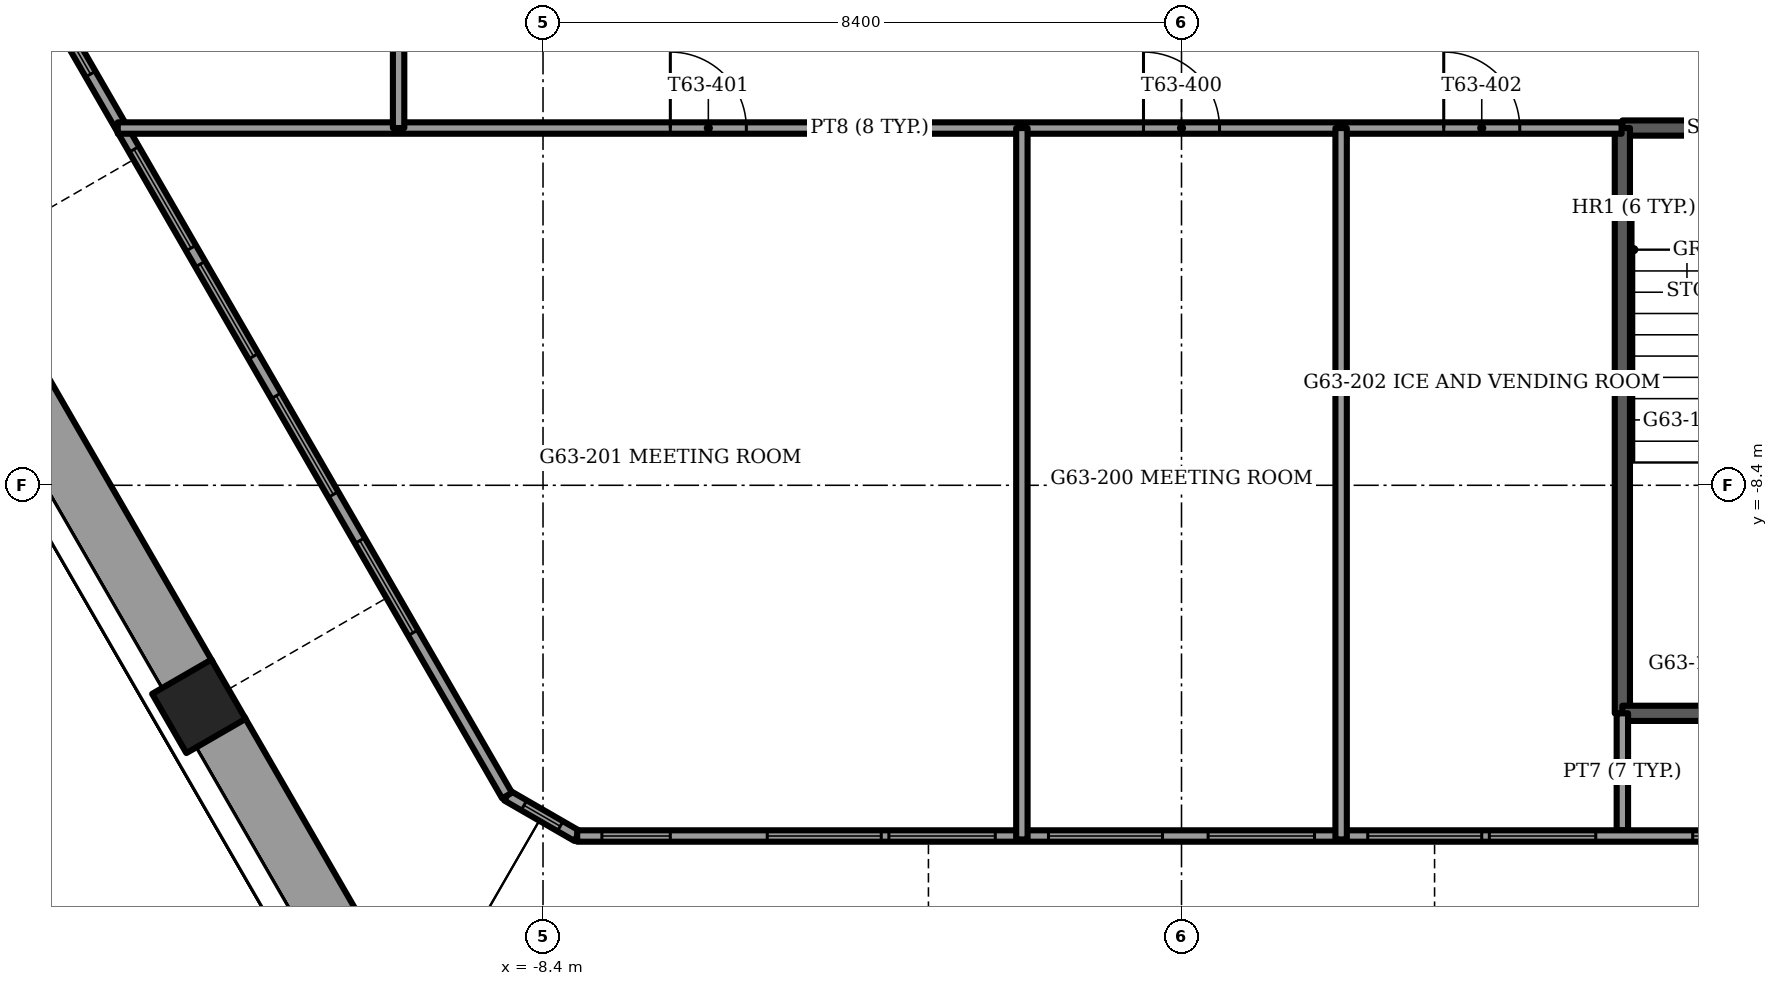
"""IFC4 building model, lengths in metres.
Left out: names, types, materials, properties, quantities, classifications, styles, units other than length and angle.
Written with IfcOpenShell. Run it as: python <this file> out.ifc"""

import sys

from ifc_helpers import new_model, si_unit, direction, frame, frame_2d, origin, origin_2d, place, context, subcontext, project, spatial, rectangle, extrude, element, fill, save


model = new_model("IFC4")
c1 = context("Model", 3, precision=1e-05, world=origin(), true_north=direction((0.0, 1.0)))
c2 = subcontext(c1, "Body", "Model", "MODEL_VIEW")
j1 = project(units=[si_unit("LENGTHUNIT", "METRE"), si_unit("PLANEANGLEUNIT", "RADIAN")], contexts=[c1])
p1 = place(None, origin())
s1 = spatial("IfcSite", under=j1, at=p1, CompositionType="ELEMENT")
p2 = place(p1, origin())
s2 = spatial("IfcBuilding", under=s1, at=p2, CompositionType="ELEMENT")
p3 = place(p2, frame((0.0, 0.0, 256.25)))
s3 = spatial("IfcBuildingStorey", under=s2, at=p3, CompositionType="ELEMENT", Elevation=256.25)
p4 = place(p3, frame((-12.928, -11.308, -1.2), z_axis=(0.0, 0.0, 1.0), x_axis=(-0.5, 0.866025403784, 0.0)))
e1 = element("IfcColumn", 1, at=p4, inside=s3, PredefinedType="COLUMN", context=c2, shape_type="SweptSolid", body=[
    extrude(rectangle(XDim=0.9, YDim=0.9, at=origin_2d()), origin(), (0.0, 0.0, 1.0), 3.75),
])
p5 = place(p3, frame((-16.047, -5.906, 0.0), z_axis=(0.0, 0.0, 1.0), x_axis=(0.500015433515, -0.866016493057, 0.0)))
e2 = element("IfcWall", 2, at=p5, inside=s3, PredefinedType="PARAPET", context=c2, shape_type="SweptSolid", body=[
    extrude(rectangle(XDim=5.819, YDim=0.9, at=frame_2d((2.909, 0.0))), origin(), (0.0, 0.0, 1.0), 1.1),
])
p6 = place(p3, frame((-12.718, -11.672, 0.0), z_axis=(0.0, 0.0, 1.0), x_axis=(0.500012810012, -0.866018007794, 0.0)))
e3 = element("IfcWall", 3, at=p6, inside=s3, PredefinedType="PARAPET", context=c2, shape_type="SweptSolid", body=[
    extrude(rectangle(XDim=4.44, YDim=0.9, at=frame_2d((2.22, 0.0))), origin(), (0.0, 0.0, 1.0), 1.1),
])
p7 = place(p3, frame((-15.246, -1.444, 0.0), z_axis=(0.0, 0.0, 1.0), x_axis=(0.500005990458, -0.866021945164, 0.0)))
e4 = element("IfcWall", 4, at=p7, inside=s3, PredefinedType="SOLIDWALL", context=c2, shape_type="SweptSolid", body=[
    extrude(rectangle(XDim=12.745, YDim=0.15, at=frame_2d((6.373, 0.0))), origin(), (0.0, 0.0, 1.0), 3.45),
])
p8 = place(p7, frame((2.93, 0.0, 0.15)))
e5 = element("IfcOpeningElement", 5, at=p8, cuts=e4, PredefinedType="OPENING", context=c2, shape_type="SweptSolid", body=[
    extrude(rectangle(XDim=1.5, YDim=2.85, at=frame_2d((0.75, 1.425))), frame((0.0, 0.075, 0.0), z_axis=(0.0, -1.0, 0.0), x_axis=(1.0, 0.0, 0.0)), (0.0, 0.0, 1.0), 0.15),
])
p9 = place(p7, frame((4.673, 0.0, 0.15)))
e6 = element("IfcOpeningElement", 6, at=p9, cuts=e4, PredefinedType="OPENING", context=c2, shape_type="SweptSolid", body=[
    extrude(rectangle(XDim=1.4, YDim=2.85, at=frame_2d((0.7, 1.425))), frame((0.0, 0.075, 0.0), z_axis=(0.0, -1.0, 0.0), x_axis=(1.0, 0.0, 0.0)), (0.0, 0.0, 1.0), 0.15),
])
p10 = place(p7, frame((6.673, 0.0, 0.15)))
e7 = element("IfcOpeningElement", 7, at=p10, cuts=e4, PredefinedType="OPENING", context=c2, shape_type="SweptSolid", body=[
    extrude(rectangle(XDim=1.5, YDim=2.85, at=frame_2d((0.75, 1.425))), frame((0.0, 0.075, 0.0), z_axis=(0.0, -1.0, 0.0), x_axis=(1.0, 0.0, 0.0)), (0.0, 0.0, 1.0), 0.15),
])
p11 = place(p7, frame((8.873, 0.0, 0.15)))
e8 = element("IfcOpeningElement", 8, at=p11, cuts=e4, PredefinedType="OPENING", context=c2, shape_type="SweptSolid", body=[
    extrude(rectangle(XDim=1.4, YDim=2.85, at=frame_2d((0.7, 1.425))), frame((0.0, 0.075, 0.0), z_axis=(0.0, -1.0, 0.0), x_axis=(1.0, 0.0, 0.0)), (0.0, 0.0, 1.0), 0.15),
])
p12 = place(p7, frame((0.286, 0.0, 0.15)))
e9 = element("IfcOpeningElement", 9, at=p12, cuts=e4, PredefinedType="OPENING", context=c2, shape_type="SweptSolid", body=[
    extrude(rectangle(XDim=1.5, YDim=2.73, at=frame_2d((0.75, 1.365))), frame((0.0, 0.075, 0.0), z_axis=(0.0, -1.0, 0.0), x_axis=(1.0, 0.0, 0.0)), (0.0, 0.0, 1.0), 0.15),
])
p13 = place(p3, frame((-7.951, -13.014, 0.0), z_axis=(0.0, 0.0, 1.0), x_axis=(1.0, 0.0, 0.0)))
e10 = element("IfcWall", 10, at=p13, inside=s3, PredefinedType="SOLIDWALL", context=c2, shape_type="SweptSolid", body=[
    extrude(rectangle(XDim=15.901, YDim=0.15, at=frame_2d((7.951, 0.0))), origin(), (0.0, 0.0, 1.0), 3.45),
])
p14 = place(p13, frame((2.501, 0.0, 0.15)))
e11 = element("IfcOpeningElement", 11, at=p14, cuts=e10, PredefinedType="OPENING", context=c2, shape_type="SweptSolid", body=[
    extrude(rectangle(XDim=1.5, YDim=2.85, at=frame_2d((0.75, 1.425))), frame((0.0, 0.075, 0.0), z_axis=(0.0, -1.0, 0.0), x_axis=(1.0, 0.0, 0.0)), (0.0, 0.0, 1.0), 0.15),
])
p15 = place(p13, frame((4.101, 0.0, 0.15)))
e12 = element("IfcOpeningElement", 12, at=p15, cuts=e10, PredefinedType="OPENING", context=c2, shape_type="SweptSolid", body=[
    extrude(rectangle(XDim=1.4, YDim=2.85, at=frame_2d((0.7, 1.425))), frame((0.0, 0.075, 0.0), z_axis=(0.0, -1.0, 0.0), x_axis=(1.0, 0.0, 0.0)), (0.0, 0.0, 1.0), 0.15),
])
p16 = place(p13, frame((6.201, 0.0, 0.15)))
e13 = element("IfcOpeningElement", 13, at=p16, cuts=e10, PredefinedType="OPENING", context=c2, shape_type="SweptSolid", body=[
    extrude(rectangle(XDim=1.5, YDim=2.85, at=frame_2d((0.75, 1.425))), frame((0.0, 0.075, 0.0), z_axis=(0.0, -1.0, 0.0), x_axis=(1.0, 0.0, 0.0)), (0.0, 0.0, 1.0), 0.15),
])
p17 = place(p13, frame((8.301, 0.0, 0.15)))
e14 = element("IfcOpeningElement", 14, at=p17, cuts=e10, PredefinedType="OPENING", context=c2, shape_type="SweptSolid", body=[
    extrude(rectangle(XDim=1.4, YDim=2.85, at=frame_2d((0.7, 1.425))), frame((0.0, 0.075, 0.0), z_axis=(0.0, -1.0, 0.0), x_axis=(1.0, 0.0, 0.0)), (0.0, 0.0, 1.0), 0.15),
])
p18 = place(p13, frame((10.401, 0.0, 0.15)))
e15 = element("IfcOpeningElement", 15, at=p18, cuts=e10, PredefinedType="OPENING", context=c2, shape_type="SweptSolid", body=[
    extrude(rectangle(XDim=1.5, YDim=2.85, at=frame_2d((0.75, 1.425))), frame((0.0, 0.075, 0.0), z_axis=(0.0, -1.0, 0.0), x_axis=(1.0, 0.0, 0.0)), (0.0, 0.0, 1.0), 0.15),
])
p19 = place(p13, frame((12.001, 0.0, 0.15)))
e16 = element("IfcOpeningElement", 16, at=p19, cuts=e10, PredefinedType="OPENING", context=c2, shape_type="SweptSolid", body=[
    extrude(rectangle(XDim=1.4, YDim=2.85, at=frame_2d((0.7, 1.425))), frame((0.0, 0.075, 0.0), z_axis=(0.0, -1.0, 0.0), x_axis=(1.0, 0.0, 0.0)), (0.0, 0.0, 1.0), 0.15),
])
p20 = place(p13, frame((0.325, 0.0, 0.15)))
e17 = element("IfcOpeningElement", 17, at=p20, cuts=e10, PredefinedType="OPENING", context=c2, shape_type="SweptSolid", body=[
    extrude(rectangle(XDim=0.9, YDim=2.73, at=frame_2d((0.45, 1.365))), frame((0.0, 0.075, 0.0), z_axis=(0.0, -1.0, 0.0), x_axis=(1.0, 0.0, 0.0)), (0.0, 0.0, 1.0), 0.15),
])
p21 = place(p13, frame((14.676, 0.0, 0.15)))
e18 = element("IfcOpeningElement", 18, at=p21, cuts=e10, PredefinedType="OPENING", context=c2, shape_type="SweptSolid", body=[
    extrude(rectangle(XDim=0.9, YDim=2.73, at=frame_2d((0.45, 1.365))), frame((0.0, 0.075, 0.0), z_axis=(0.0, -1.0, 0.0), x_axis=(1.0, 0.0, 0.0)), (0.0, 0.0, 1.0), 0.15),
])
p22 = place(p3, frame((-8.873, -12.481, 0.0), z_axis=(0.0, 0.0, 1.0), x_axis=(0.866048165231, -0.499960573946, 0.0)))
e19 = element("IfcWall", 19, at=p22, inside=s3, PredefinedType="SOLIDWALL", context=c2, shape_type="SweptSolid", body=[
    extrude(rectangle(XDim=1.065, YDim=0.15, at=frame_2d((0.532, 0.0))), origin(), (0.0, 0.0, 1.0), 3.45),
])
p23 = place(p22, frame((0.258, 0.0, 0.15)))
e20 = element("IfcOpeningElement", 20, at=p23, cuts=e19, PredefinedType="OPENING", context=c2, shape_type="SweptSolid", body=[
    extrude(rectangle(XDim=0.55, YDim=2.85, at=frame_2d((0.275, 1.425))), frame((0.0, 0.075, 0.0), z_axis=(0.0, -1.0, 0.0), x_axis=(1.0, 0.0, 0.0)), (0.0, 0.0, 1.0), 0.15),
])
p24 = place(p3, frame((5.8, -3.7, -0.3), z_axis=(0.0, 0.0, 1.0), x_axis=(1.0, 0.0, 0.0)))
e21 = element("IfcWall", 21, at=p24, inside=s3, PredefinedType="SOLIDWALL", context=c2, shape_type="SweptSolid", body=[
    extrude(rectangle(XDim=3.35, YDim=0.2, at=frame_2d((1.675, 0.0))), origin(), (0.0, 0.0, 1.0), 3.75),
])
p25 = place(p24, frame((1.125, 0.0, 0.0)))
e22 = element("IfcOpeningElement", 22, at=p25, cuts=e21, PredefinedType="OPENING", context=c2, shape_type="SweptSolid", body=[
    extrude(rectangle(XDim=1.1, YDim=2.1, at=frame_2d((0.55, 1.05))), frame((0.0, 0.1, 0.0), z_axis=(0.0, -1.0, 0.0), x_axis=(1.0, 0.0, 0.0)), (0.0, 0.0, 1.0), 0.2),
])
p26 = place(p3, frame((5.8, -3.7, -0.3), z_axis=(0.0, 0.0, 1.0), x_axis=(0.0, -1.0, 0.0)))
e23 = element("IfcWall", 23, at=p26, inside=s3, PredefinedType="SOLIDWALL", context=c2, shape_type="SweptSolid", body=[
    extrude(rectangle(XDim=7.7, YDim=0.2, at=frame_2d((3.85, 0.0))), origin(), (0.0, 0.0, 1.0), 3.75),
])
p27 = place(p3, frame((5.8, -11.4, -0.3), z_axis=(0.0, 0.0, 1.0), x_axis=(1.0, 0.0, 0.0)))
e24 = element("IfcWall", 24, at=p27, inside=s3, PredefinedType="SOLIDWALL", context=c2, shape_type="SweptSolid", body=[
    extrude(rectangle(XDim=3.35, YDim=0.2, at=frame_2d((1.675, 0.0))), origin(), (0.0, 0.0, 1.0), 3.75),
])
p28 = place(p3, frame((5.8, -11.4, 0.0), z_axis=(0.0, 0.0, 1.0), x_axis=(0.0, -1.0, 0.0)))
e25 = element("IfcWall", 25, at=p28, inside=s3, PredefinedType="PARTITIONING", context=c2, shape_type="SweptSolid", body=[
    extrude(rectangle(XDim=1.539, YDim=0.15, at=frame_2d((0.77, 0.0))), origin(), (0.0, 0.0, 1.0), 3.45),
])
p29 = place(p3, frame((-13.995, -3.7, 0.0), z_axis=(0.0, 0.0, 1.0), x_axis=(1.0, 0.0, 0.0)))
e26 = element("IfcWall", 26, at=p29, inside=s3, PredefinedType="PARTITIONING", context=c2, shape_type="SweptSolid", body=[
    extrude(rectangle(XDim=19.785, YDim=0.15, at=frame_2d((9.893, 0.0))), origin(), (0.0, 0.0, 1.0), 3.45),
])
p30 = place(p29, frame((13.495, 0.0, 0.0)))
e27 = element("IfcOpeningElement", 27, at=p30, cuts=e26, PredefinedType="OPENING", context=c2, shape_type="SweptSolid", body=[
    extrude(rectangle(XDim=1.0, YDim=2.1, at=frame_2d((0.5, 1.05))), frame((0.0, 0.075, 0.0), z_axis=(0.0, -1.0, 0.0), x_axis=(1.0, 0.0, 0.0)), (0.0, 0.0, 1.0), 0.15),
])
p31 = place(p29, frame((7.27, 0.0, 0.0)))
e28 = element("IfcOpeningElement", 28, at=p31, cuts=e26, PredefinedType="OPENING", context=c2, shape_type="SweptSolid", body=[
    extrude(rectangle(XDim=1.0, YDim=2.1, at=frame_2d((0.5, 1.05))), frame((0.0, 0.075, 0.0), z_axis=(0.0, -1.0, 0.0), x_axis=(1.0, 0.0, 0.0)), (0.0, 0.0, 1.0), 0.15),
])
p32 = place(p29, frame((17.445, 0.0, 0.0)))
e29 = element("IfcOpeningElement", 29, at=p32, cuts=e26, PredefinedType="OPENING", context=c2, shape_type="SweptSolid", body=[
    extrude(rectangle(XDim=1.0, YDim=2.1, at=frame_2d((0.5, 1.05))), frame((0.0, 0.075, 0.0), z_axis=(0.0, -1.0, 0.0), x_axis=(1.0, 0.0, 0.0)), (0.0, 0.0, 1.0), 0.15),
])
for number, where, z_axis, x_axis in (
    (30, (2.1, -13.059, 0.0), (0.0, 0.0, 1.0), (0.0, 1.0, 0.0)),
    (31, (-2.1, -13.059, 0.0), (0.0, 0.0, 1.0), (0.0, 1.0, 0.0)),
):
    element("IfcWall", number, at=place(p3, frame(where, z_axis=z_axis, x_axis=x_axis)), inside=s3, PredefinedType="PARTITIONING", context=c2, shape_type="SweptSolid", body=[
        extrude(rectangle(XDim=9.359, YDim=0.15, at=frame_2d((4.68, 0.0))), origin(), (0.0, 0.0, 1.0), 3.45),
    ])
p33 = place(p3, frame((-10.3, -3.7, 0.0), z_axis=(0.0, 0.0, 1.0), x_axis=(0.0, 1.0, 0.0)))
e32 = element("IfcWall", 32, at=p33, inside=s3, PredefinedType="PARTITIONING", context=c2, shape_type="SweptSolid", body=[
    extrude(rectangle(XDim=11.978, YDim=0.15, at=frame_2d((5.989, 0.0))), origin(), (0.0, 0.0, 1.0), 3.45),
])
p34 = place(p33, frame((2.65, 0.0, 0.0)))
e33 = element("IfcOpeningElement", 33, at=p34, cuts=e32, PredefinedType="OPENING", context=c2, shape_type="SweptSolid", body=[
    extrude(rectangle(XDim=1.0, YDim=2.1, at=frame_2d((0.5, 1.05))), frame((0.0, 0.075, 0.0), z_axis=(0.0, -1.0, 0.0), x_axis=(1.0, 0.0, 0.0)), (0.0, 0.0, 1.0), 0.15),
])
p35 = place(p33, frame((8.52, 0.0, 0.0)))
e34 = element("IfcOpeningElement", 34, at=p35, cuts=e32, PredefinedType="OPENING", context=c2, shape_type="SweptSolid", body=[
    extrude(rectangle(XDim=1.0, YDim=2.1, at=frame_2d((0.5, 1.05))), frame((0.0, 0.075, 0.0), z_axis=(0.0, -1.0, 0.0), x_axis=(1.0, 0.0, 0.0)), (0.0, 0.0, 1.0), 0.15),
])
p36 = place(p8, origin())
e35 = element("IfcWindow", 35, at=p36, inside=s3, PartitioningType="SINGLE_PANEL", PredefinedType="WINDOW", context=c2, shape_type="SweptSolid", body=[
    extrude(rectangle(XDim=1.5, YDim=2.85, at=frame_2d((0.75, 1.425))), frame((0.0, 0.03, 0.0), z_axis=(0.0, -1.0, 0.0), x_axis=(1.0, 0.0, 0.0)), (0.0, 0.0, 1.0), 0.06),
])
fill(e5, e35)
p37 = place(p9, origin())
e36 = element("IfcWindow", 36, at=p37, inside=s3, PartitioningType="SINGLE_PANEL", PredefinedType="WINDOW", context=c2, shape_type="SweptSolid", body=[
    extrude(rectangle(XDim=1.4, YDim=2.85, at=frame_2d((0.7, 1.425))), frame((0.0, 0.03, 0.0), z_axis=(0.0, -1.0, 0.0), x_axis=(1.0, 0.0, 0.0)), (0.0, 0.0, 1.0), 0.06),
])
fill(e6, e36)
p38 = place(p10, origin())
e37 = element("IfcWindow", 37, at=p38, inside=s3, PartitioningType="SINGLE_PANEL", PredefinedType="WINDOW", context=c2, shape_type="SweptSolid", body=[
    extrude(rectangle(XDim=1.5, YDim=2.85, at=frame_2d((0.75, 1.425))), frame((0.0, 0.03, 0.0), z_axis=(0.0, -1.0, 0.0), x_axis=(1.0, 0.0, 0.0)), (0.0, 0.0, 1.0), 0.06),
])
fill(e7, e37)
p39 = place(p11, origin())
e38 = element("IfcWindow", 38, at=p39, inside=s3, PartitioningType="SINGLE_PANEL", PredefinedType="WINDOW", context=c2, shape_type="SweptSolid", body=[
    extrude(rectangle(XDim=1.4, YDim=2.85, at=frame_2d((0.7, 1.425))), frame((0.0, 0.03, 0.0), z_axis=(0.0, -1.0, 0.0), x_axis=(1.0, 0.0, 0.0)), (0.0, 0.0, 1.0), 0.06),
])
fill(e8, e38)
p40 = place(p12, origin())
e39 = element("IfcWindow", 39, at=p40, inside=s3, PartitioningType="SINGLE_PANEL", PredefinedType="WINDOW", context=c2, shape_type="SweptSolid", body=[
    extrude(rectangle(XDim=1.5, YDim=2.73, at=frame_2d((0.75, 1.365))), frame((0.0, 0.03, 0.0), z_axis=(0.0, -1.0, 0.0), x_axis=(1.0, 0.0, 0.0)), (0.0, 0.0, 1.0), 0.06),
])
fill(e9, e39)
p41 = place(p14, origin())
e40 = element("IfcWindow", 40, at=p41, inside=s3, PartitioningType="SINGLE_PANEL", PredefinedType="WINDOW", context=c2, shape_type="SweptSolid", body=[
    extrude(rectangle(XDim=1.5, YDim=2.85, at=frame_2d((0.75, 1.425))), frame((0.0, 0.03, 0.0), z_axis=(0.0, -1.0, 0.0), x_axis=(1.0, 0.0, 0.0)), (0.0, 0.0, 1.0), 0.06),
])
fill(e11, e40)
p42 = place(p15, origin())
e41 = element("IfcWindow", 41, at=p42, inside=s3, PartitioningType="SINGLE_PANEL", PredefinedType="WINDOW", context=c2, shape_type="SweptSolid", body=[
    extrude(rectangle(XDim=1.4, YDim=2.85, at=frame_2d((0.7, 1.425))), frame((0.0, 0.03, 0.0), z_axis=(0.0, -1.0, 0.0), x_axis=(1.0, 0.0, 0.0)), (0.0, 0.0, 1.0), 0.06),
])
fill(e12, e41)
p43 = place(p16, origin())
e42 = element("IfcWindow", 42, at=p43, inside=s3, PartitioningType="SINGLE_PANEL", PredefinedType="WINDOW", context=c2, shape_type="SweptSolid", body=[
    extrude(rectangle(XDim=1.5, YDim=2.85, at=frame_2d((0.75, 1.425))), frame((0.0, 0.03, 0.0), z_axis=(0.0, -1.0, 0.0), x_axis=(1.0, 0.0, 0.0)), (0.0, 0.0, 1.0), 0.06),
])
fill(e13, e42)
p44 = place(p17, origin())
e43 = element("IfcWindow", 43, at=p44, inside=s3, PartitioningType="SINGLE_PANEL", PredefinedType="WINDOW", context=c2, shape_type="SweptSolid", body=[
    extrude(rectangle(XDim=1.4, YDim=2.85, at=frame_2d((0.7, 1.425))), frame((0.0, 0.03, 0.0), z_axis=(0.0, -1.0, 0.0), x_axis=(1.0, 0.0, 0.0)), (0.0, 0.0, 1.0), 0.06),
])
fill(e14, e43)
p45 = place(p18, origin())
e44 = element("IfcWindow", 44, at=p45, inside=s3, PartitioningType="SINGLE_PANEL", PredefinedType="WINDOW", context=c2, shape_type="SweptSolid", body=[
    extrude(rectangle(XDim=1.5, YDim=2.85, at=frame_2d((0.75, 1.425))), frame((0.0, 0.03, 0.0), z_axis=(0.0, -1.0, 0.0), x_axis=(1.0, 0.0, 0.0)), (0.0, 0.0, 1.0), 0.06),
])
fill(e15, e44)
p46 = place(p19, origin())
e45 = element("IfcWindow", 45, at=p46, inside=s3, PartitioningType="SINGLE_PANEL", PredefinedType="WINDOW", context=c2, shape_type="SweptSolid", body=[
    extrude(rectangle(XDim=1.4, YDim=2.85, at=frame_2d((0.7, 1.425))), frame((0.0, 0.03, 0.0), z_axis=(0.0, -1.0, 0.0), x_axis=(1.0, 0.0, 0.0)), (0.0, 0.0, 1.0), 0.06),
])
fill(e16, e45)
p47 = place(p20, origin())
e46 = element("IfcWindow", 46, at=p47, inside=s3, PartitioningType="SINGLE_PANEL", PredefinedType="WINDOW", context=c2, shape_type="SweptSolid", body=[
    extrude(rectangle(XDim=0.9, YDim=2.73, at=frame_2d((0.45, 1.365))), frame((0.0, 0.03, 0.0), z_axis=(0.0, -1.0, 0.0), x_axis=(1.0, 0.0, 0.0)), (0.0, 0.0, 1.0), 0.06),
])
fill(e17, e46)
p48 = place(p21, origin())
e47 = element("IfcWindow", 47, at=p48, inside=s3, PartitioningType="SINGLE_PANEL", PredefinedType="WINDOW", context=c2, shape_type="SweptSolid", body=[
    extrude(rectangle(XDim=0.9, YDim=2.73, at=frame_2d((0.45, 1.365))), frame((0.0, 0.03, 0.0), z_axis=(0.0, -1.0, 0.0), x_axis=(1.0, 0.0, 0.0)), (0.0, 0.0, 1.0), 0.06),
])
fill(e18, e47)
p49 = place(p23, origin())
e48 = element("IfcWindow", 48, at=p49, inside=s3, PartitioningType="SINGLE_PANEL", PredefinedType="WINDOW", context=c2, shape_type="SweptSolid", body=[
    extrude(rectangle(XDim=0.55, YDim=2.85, at=frame_2d((0.275, 1.425))), frame((0.0, 0.03, 0.0), z_axis=(0.0, -1.0, 0.0), x_axis=(1.0, 0.0, 0.0)), (0.0, 0.0, 1.0), 0.06),
])
fill(e20, e48)
p50 = place(p30, origin())
e49 = element("IfcDoor", 49, at=p50, inside=s3, OperationType="SINGLE_SWING_LEFT", PredefinedType="DOOR", context=c2, shape_type="SweptSolid", body=[
    extrude(rectangle(XDim=1.0, YDim=2.1, at=frame_2d((0.5, 1.05))), frame((0.0, 0.025, 0.0), z_axis=(0.0, -1.0, 0.0), x_axis=(1.0, 0.0, 0.0)), (0.0, 0.0, 1.0), 0.05),
])
fill(e27, e49)
p51 = place(p31, origin())
e50 = element("IfcDoor", 50, at=p51, inside=s3, OperationType="SINGLE_SWING_RIGHT", PredefinedType="DOOR", context=c2, shape_type="SweptSolid", body=[
    extrude(rectangle(XDim=1.0, YDim=2.1, at=frame_2d((0.5, 1.05))), frame((0.0, 0.025, 0.0), z_axis=(0.0, -1.0, 0.0), x_axis=(1.0, 0.0, 0.0)), (0.0, 0.0, 1.0), 0.05),
])
fill(e28, e50)
p52 = place(p32, origin())
e51 = element("IfcDoor", 51, at=p52, inside=s3, OperationType="SINGLE_SWING_LEFT", PredefinedType="DOOR", context=c2, shape_type="SweptSolid", body=[
    extrude(rectangle(XDim=1.0, YDim=2.1, at=frame_2d((0.5, 1.05))), frame((0.0, 0.025, 0.0), z_axis=(0.0, -1.0, 0.0), x_axis=(1.0, 0.0, 0.0)), (0.0, 0.0, 1.0), 0.05),
])
fill(e29, e51)
save(model, sys.argv[1])
